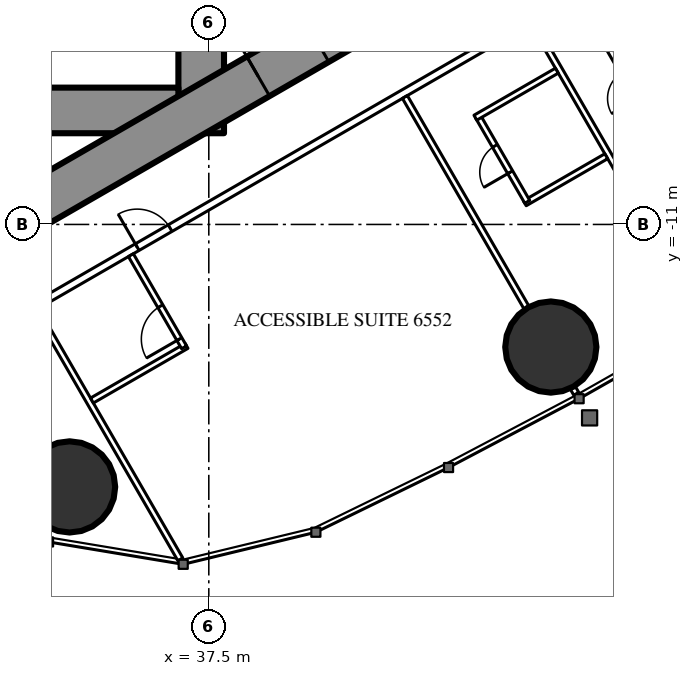
"""IFC4 building model, lengths in metres.
Left out: names, types, materials, properties, quantities, classifications, styles, units other than length and angle.
Written with IfcOpenShell. Run it as: python <this file> out.ifc"""

import sys

from ifc_helpers import new_model, si_unit, direction, frame, frame_2d, origin, origin_2d, place, context, subcontext, project, spatial, rectangle, circle, extrude, element, fill, save


model = new_model("IFC4")
c1 = context("Model", 3, precision=1e-05, world=origin(), true_north=direction((0.0, 1.0)))
c2 = subcontext(c1, "Body", "Model", "MODEL_VIEW")
j1 = project(units=[si_unit("LENGTHUNIT", "METRE"), si_unit("PLANEANGLEUNIT", "RADIAN")], contexts=[c1])
p1 = place(None, origin())
s1 = spatial("IfcSite", under=j1, at=p1, CompositionType="ELEMENT")
p2 = place(p1, origin())
s2 = spatial("IfcBuilding", under=s1, at=p2, CompositionType="ELEMENT")
p3 = place(p2, frame((0.0, 0.0, 244.1)))
s3 = spatial("IfcBuildingStorey", under=s2, at=p3, CompositionType="ELEMENT", Elevation=244.1)
for number, where, z_axis, x_axis in (
    (1, (33.837, -17.906, 0.0), (0.0, 0.0, 1.0), (1.0, 0.0, 0.0)),
    (2, (46.499, -14.226, 0.0), (0.0, 0.0, 1.0), (1.0, 0.0, 0.0)),
):
    element("IfcColumn", number, at=place(p3, frame(where, z_axis=z_axis, x_axis=x_axis)), inside=s3, PredefinedType="COLUMN", context=c2, shape_type="SweptSolid", body=[
        extrude(circle(Radius=1.2, at=origin_2d()), origin(), (0.0, 0.0, 1.0), 3.6),
    ])
p4 = place(p3, frame((37.3, -8.6, 0.0), z_axis=(0.0, 0.0, 1.0), x_axis=(0.0, 1.0, 0.0)))
e3 = element("IfcWall", 3, at=p4, inside=s3, PredefinedType="SHEAR", context=c2, shape_type="SweptSolid", body=[
    extrude(rectangle(XDim=17.2, YDim=1.2, at=frame_2d((8.6, 0.0))), origin(), (0.0, 0.0, 1.0), 3.6),
])
p5 = place(p4, frame((7.7, 0.0, 0.0)))
e4 = element("IfcOpeningElement", 4, at=p5, cuts=e3, PredefinedType="OPENING", context=c2, shape_type="SweptSolid", body=[
    extrude(rectangle(XDim=1.8, YDim=2.2, at=frame_2d((0.9, 1.1))), frame((0.0, 0.61, 0.0), z_axis=(0.0, -1.0, 0.0), x_axis=(1.0, 0.0, 0.0)), (0.0, 0.0, 1.0), 1.22),
])
p6 = place(p3, frame((28.3, -8.0, 0.0), z_axis=(0.0, 0.0, 1.0), x_axis=(1.0, 0.0, 0.0)))
e5 = element("IfcWall", 5, at=p6, inside=s3, PredefinedType="SHEAR", context=c2, shape_type="SweptSolid", body=[
    extrude(rectangle(XDim=8.4, YDim=1.2, at=frame_2d((4.2, 0.0))), origin(), (0.0, 0.0, 1.0), 3.6),
])
p7 = place(p6, frame((0.25, 0.0, 0.0)))
e6 = element("IfcOpeningElement", 6, at=p7, cuts=e5, PredefinedType="OPENING", context=c2, shape_type="SweptSolid", body=[
    extrude(rectangle(XDim=1.0, YDim=2.2, at=frame_2d((0.5, 1.1))), frame((0.0, 0.61, 0.0), z_axis=(0.0, -1.0, 0.0), x_axis=(1.0, 0.0, 0.0)), (0.0, 0.0, 1.0), 1.22),
])
p8 = place(p3, frame((27.2, -13.8, 0.0), z_axis=(0.0, 0.0, 1.0), x_axis=(0.866027159892, 0.499996958321, 0.0)))
e7 = element("IfcWall", 7, at=p8, inside=s3, PredefinedType="SHEAR", context=c2, shape_type="SweptSolid", body=[
    extrude(rectangle(XDim=27.947, YDim=1.2, at=frame_2d((13.973, 0.0))), origin(), (0.0, 0.0, 1.0), 3.6),
])
p9 = place(p8, frame((4.6, 0.0, 0.0)))
e8 = element("IfcOpeningElement", 8, at=p9, cuts=e7, PredefinedType="OPENING", context=c2, shape_type="SweptSolid", body=[
    extrude(rectangle(XDim=1.0, YDim=2.2, at=frame_2d((0.5, 1.1))), frame((0.0, 0.61, 0.0), z_axis=(0.0, -1.0, 0.0), x_axis=(1.0, 0.0, 0.0)), (0.0, 0.0, 1.0), 1.22),
])
p10 = place(p8, frame((13.395, 0.0, 0.0)))
e9 = element("IfcOpeningElement", 9, at=p10, cuts=e7, PredefinedType="OPENING", context=c2, shape_type="SweptSolid", body=[
    extrude(rectangle(XDim=1.8, YDim=2.2, at=frame_2d((0.9, 1.1))), frame((0.0, 0.61, 0.0), z_axis=(0.0, -1.0, 0.0), x_axis=(1.0, 0.0, 0.0)), (0.0, 0.0, 1.0), 1.22),
])
p11 = place(p3, frame((28.959, -15.44, 0.0), z_axis=(0.0, 0.0, 1.0), x_axis=(0.866025227435, 0.500000305447, 0.0)))
e10 = element("IfcWall", 10, at=p11, inside=s3, PredefinedType="PARTITIONING", context=c2, shape_type="SweptSolid", body=[
    extrude(rectangle(XDim=30.88, YDim=0.2, at=frame_2d((15.44, 0.0))), origin(), (0.0, 0.0, 1.0), 3.35),
])
p12 = place(p11, frame((1.494, 0.0, 0.0)))
e11 = element("IfcOpeningElement", 11, at=p12, cuts=e10, PredefinedType="OPENING", context=c2, shape_type="SweptSolid", body=[
    extrude(rectangle(XDim=1.8, YDim=2.04, at=frame_2d((0.9, 1.02))), frame((0.0, 0.11, 0.0), z_axis=(0.0, -1.0, 0.0), x_axis=(1.0, 0.0, 0.0)), (0.0, 0.0, 1.0), 0.22),
])
p13 = place(p11, frame((7.687, 0.0, 0.0)))
e12 = element("IfcOpeningElement", 12, at=p13, cuts=e10, PredefinedType="OPENING", context=c2, shape_type="SweptSolid", body=[
    extrude(rectangle(XDim=1.0, YDim=2.2, at=frame_2d((0.5, 1.1))), frame((0.0, 0.11, 0.0), z_axis=(0.0, -1.0, 0.0), x_axis=(1.0, 0.0, 0.0)), (0.0, 0.0, 1.0), 0.22),
])
p14 = place(p11, frame((18.321, 0.0, 0.0)))
e13 = element("IfcOpeningElement", 13, at=p14, cuts=e10, PredefinedType="OPENING", context=c2, shape_type="SweptSolid", body=[
    extrude(rectangle(XDim=0.95, YDim=2.2, at=frame_2d((0.475, 1.1))), frame((0.0, 0.11, 0.0), z_axis=(0.0, -1.0, 0.0), x_axis=(1.0, 0.0, 0.0)), (0.0, 0.0, 1.0), 0.22),
])
p15 = place(p11, frame((22.203, 0.0, 0.0)))
e14 = element("IfcOpeningElement", 14, at=p15, cuts=e10, PredefinedType="OPENING", context=c2, shape_type="SweptSolid", body=[
    extrude(rectangle(XDim=0.95, YDim=2.2, at=frame_2d((0.475, 1.1))), frame((0.0, 0.11, 0.0), z_axis=(0.0, -1.0, 0.0), x_axis=(1.0, 0.0, 0.0)), (0.0, 0.0, 1.0), 0.22),
])
p16 = place(p11, frame((26.192, 0.0, 0.0)))
e15 = element("IfcOpeningElement", 15, at=p16, cuts=e10, PredefinedType="OPENING", context=c2, shape_type="SweptSolid", body=[
    extrude(rectangle(XDim=1.8, YDim=2.2, at=frame_2d((0.9, 1.1))), frame((0.0, 0.11, 0.0), z_axis=(0.0, -1.0, 0.0), x_axis=(1.0, 0.0, 0.0)), (0.0, 0.0, 1.0), 0.22),
])
p17 = place(p3, frame((32.96, -13.246, 0.0), z_axis=(0.0, 0.0, 1.0), x_axis=(0.500000236886, -0.866025267018, 0.0)))
e16 = element("IfcWall", 16, at=p17, inside=s3, PredefinedType="PARTITIONING", context=c2, shape_type="SweptSolid", body=[
    extrude(rectangle(XDim=7.583, YDim=0.15, at=frame_2d((3.791, 0.0))), origin(), (0.0, 0.0, 1.0), 3.35),
])
p18 = place(p3, frame((42.66, -7.646, 0.0), z_axis=(0.0, 0.0, 1.0), x_axis=(0.499996592859, -0.866027370889, 0.0)))
e17 = element("IfcWall", 17, at=p18, inside=s3, PredefinedType="PARTITIONING", context=c2, shape_type="SweptSolid", body=[
    extrude(rectangle(XDim=6.398, YDim=0.15, at=frame_2d((3.199, 0.0))), origin(), (0.0, 0.0, 1.0), 2.45),
])
p19 = place(p3, frame((47.079, -15.3, 0.0), z_axis=(0.0, 0.0, 1.0), x_axis=(0.499212083968, -0.866479829667, 0.0)))
e18 = element("IfcWall", 18, at=p19, inside=s3, PredefinedType="PARTITIONING", context=c2, shape_type="SweptSolid", body=[
    extrude(rectangle(XDim=0.179, YDim=0.15, at=frame_2d((0.09, 0.0))), origin(), (0.0, 0.0, 1.0), 2.45),
])
p20 = place(p3, frame((46.023, -5.704, 0.0), z_axis=(0.0, 0.0, 1.0), x_axis=(0.499984478165, -0.866034365135, 0.0)))
e19 = element("IfcWall", 19, at=p20, inside=s3, PredefinedType="PARTITIONING", context=c2, shape_type="SweptSolid", body=[
    extrude(rectangle(XDim=6.426, YDim=0.15, at=frame_2d((3.213, 0.0))), origin(), (0.0, 0.0, 1.0), 2.45),
])
p21 = place(p3, frame((34.425, -15.633, 0.0), z_axis=(0.0, 0.0, 1.0), x_axis=(0.866018712932, 0.500011588718, 0.0)))
e20 = element("IfcWall", 20, at=p21, inside=s3, PredefinedType="PARTITIONING", context=c2, shape_type="SweptSolid", body=[
    extrude(rectangle(XDim=2.875, YDim=0.15, at=frame_2d((1.438, 0.0))), origin(), (0.0, 0.0, 1.0), 3.35),
])
p22 = place(p3, frame((35.45, -11.808, 0.0), z_axis=(0.0, 0.0, 1.0), x_axis=(0.49994636267, -0.866056369097, 0.0)))
e21 = element("IfcWall", 21, at=p22, inside=s3, PredefinedType="PARTITIONING", context=c2, shape_type="SweptSolid", body=[
    extrude(rectangle(XDim=2.8, YDim=0.15, at=frame_2d((1.4, 0.0))), origin(), (0.0, 0.0, 1.0), 3.35),
])
p23 = place(p22, frame((1.55, 0.0, 0.0)))
e22 = element("IfcOpeningElement", 22, at=p23, cuts=e21, PredefinedType="OPENING", context=c2, shape_type="SweptSolid", body=[
    extrude(rectangle(XDim=1.0, YDim=2.2, at=frame_2d((0.5, 1.1))), frame((0.0, 0.085, 0.0), z_axis=(0.0, -1.0, 0.0), x_axis=(1.0, 0.0, 0.0)), (0.0, 0.0, 1.0), 0.17),
])
p24 = place(p3, frame((45.814, -10.443, 0.0), z_axis=(0.0, 0.0, 1.0), x_axis=(0.866073894602, 0.499916002032, 0.0)))
e23 = element("IfcWall", 23, at=p24, inside=s3, PredefinedType="PARTITIONING", context=c2, shape_type="SweptSolid", body=[
    extrude(rectangle(XDim=2.475, YDim=0.15, at=frame_2d((1.238, 0.0))), origin(), (0.0, 0.0, 1.0), 3.35),
])
p25 = place(p3, frame((44.579, -8.154, 0.0), z_axis=(0.0, 0.0, 1.0), x_axis=(0.500006934395, -0.866021400173, 0.0)))
e24 = element("IfcWall", 24, at=p25, inside=s3, PredefinedType="PARTITIONING", context=c2, shape_type="SweptSolid", body=[
    extrude(rectangle(XDim=2.6, YDim=0.15, at=frame_2d((1.3, 0.0))), origin(), (0.0, 0.0, 1.0), 3.35),
])
p26 = place(p25, frame((0.9, 0.0, 0.0)))
e25 = element("IfcOpeningElement", 25, at=p26, cuts=e24, PredefinedType="OPENING", context=c2, shape_type="SweptSolid", body=[
    extrude(rectangle(XDim=0.8, YDim=2.2, at=frame_2d((0.4, 1.1))), frame((0.0, 0.085, 0.0), z_axis=(0.0, -1.0, 0.0), x_axis=(1.0, 0.0, 0.0)), (0.0, 0.0, 1.0), 0.17),
])
p27 = place(p3, frame((44.514, -8.191, 0.0), z_axis=(0.0, 0.0, 1.0), x_axis=(0.866031185235, 0.4999899861, 0.0)))
e26 = element("IfcWall", 26, at=p27, inside=s3, PredefinedType="PARTITIONING", context=c2, shape_type="SweptSolid", body=[
    extrude(rectangle(XDim=2.475, YDim=0.15, at=frame_2d((1.238, 0.0))), origin(), (0.0, 0.0, 1.0), 3.35),
])
p28 = place(p3, frame((47.942, -6.213, 0.0), z_axis=(0.0, 0.0, 1.0), x_axis=(0.500047596559, -0.865997922154, 0.0)))
e27 = element("IfcWall", 27, at=p28, inside=s3, PredefinedType="PARTITIONING", context=c2, shape_type="SweptSolid", body=[
    extrude(rectangle(XDim=2.6, YDim=0.15, at=frame_2d((1.3, 0.0))), origin(), (0.0, 0.0, 1.0), 3.35),
])
p29 = place(p28, frame((0.9, 0.0, 0.0)))
e28 = element("IfcOpeningElement", 28, at=p29, cuts=e27, PredefinedType="OPENING", context=c2, shape_type="SweptSolid", body=[
    extrude(rectangle(XDim=0.8, YDim=2.2, at=frame_2d((0.4, 1.1))), frame((0.0, 0.085, 0.0), z_axis=(0.0, -1.0, 0.0), x_axis=(1.0, 0.0, 0.0)), (0.0, 0.0, 1.0), 0.17),
])
p30 = place(p23, origin())
e29 = element("IfcDoor", 29, at=p30, inside=s3, OperationType="SINGLE_SWING_RIGHT", PredefinedType="DOOR", context=c2, shape_type="SweptSolid", body=[
    extrude(rectangle(XDim=1.0, YDim=2.2, at=frame_2d((0.5, 1.1))), frame((0.0, 0.025, 0.0), z_axis=(0.0, -1.0, 0.0), x_axis=(1.0, 0.0, 0.0)), (0.0, 0.0, 1.0), 0.05),
])
fill(e22, e29)
p31 = place(p13, origin())
e30 = element("IfcDoor", 30, at=p31, inside=s3, OperationType="SINGLE_SWING_LEFT", PredefinedType="DOOR", context=c2, shape_type="SweptSolid", body=[
    extrude(rectangle(XDim=1.0, YDim=2.2, at=frame_2d((0.5, 1.1))), frame((0.0, 0.025, 0.0), z_axis=(0.0, -1.0, 0.0), x_axis=(1.0, 0.0, 0.0)), (0.0, 0.0, 1.0), 0.05),
])
fill(e12, e30)
p32 = place(p26, origin())
e31 = element("IfcDoor", 31, at=p32, inside=s3, OperationType="SINGLE_SWING_RIGHT", PredefinedType="DOOR", context=c2, shape_type="SweptSolid", body=[
    extrude(rectangle(XDim=0.8, YDim=2.2, at=frame_2d((0.4, 1.1))), frame((0.0, 0.025, 0.0), z_axis=(0.0, -1.0, 0.0), x_axis=(1.0, 0.0, 0.0)), (0.0, 0.0, 1.0), 0.05),
])
fill(e25, e31)
p33 = place(p10, origin())
e32 = element("IfcDoor", 32, at=p33, inside=s3, OperationType="DOUBLE_DOOR_SINGLE_SWING", PredefinedType="DOOR", context=c2, shape_type="SweptSolid", body=[
    extrude(rectangle(XDim=1.8, YDim=2.2, at=frame_2d((0.9, 1.1))), frame((0.0, 0.025, 0.0), z_axis=(0.0, -1.0, 0.0), x_axis=(1.0, 0.0, 0.0)), (0.0, 0.0, 1.0), 0.05),
])
fill(e9, e32)
save(model, sys.argv[1])
